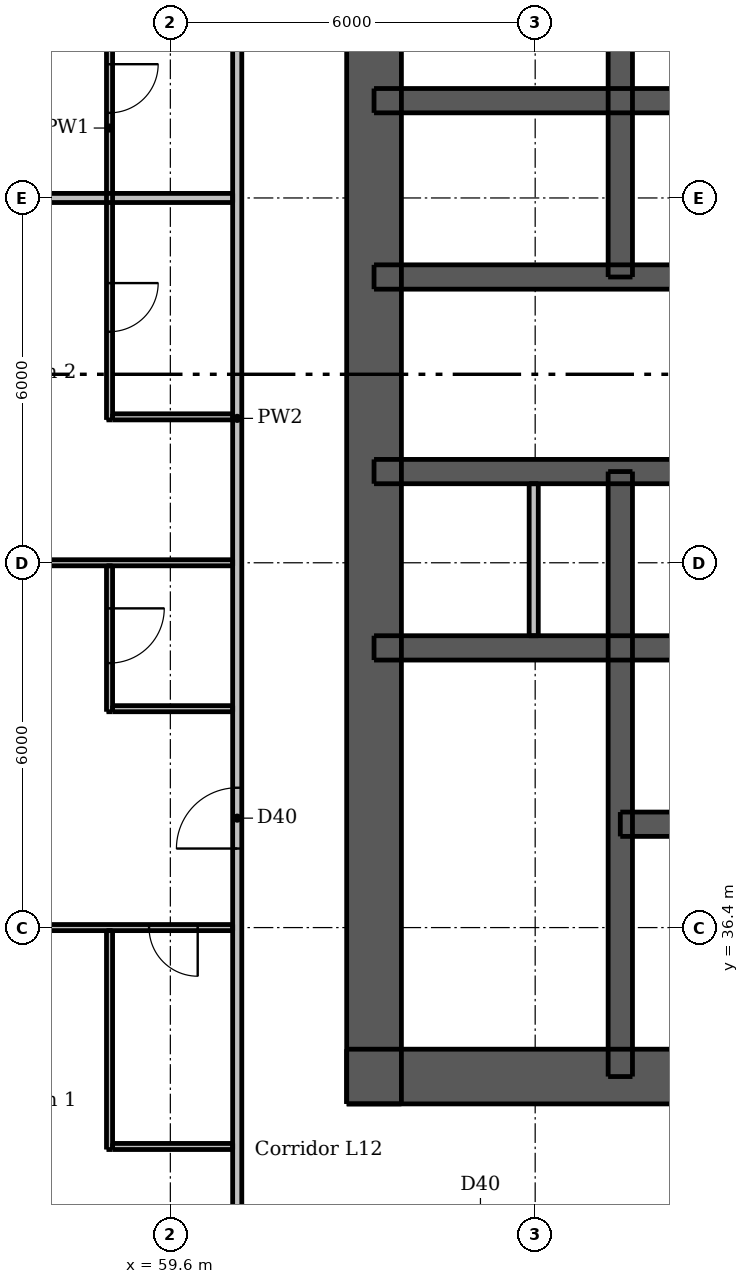
"""IFC4 building model, lengths in metres.
Left out: names, types, materials, properties, quantities, classifications, styles, units other than length and angle.
Written with IfcOpenShell. Run it as: python <this file> out.ifc"""

import sys

from ifc_helpers import new_model, si_unit, direction, frame, frame_2d, origin, place, context, subcontext, project, spatial, rectangle, extrude, element, fill, save


model = new_model("IFC4")
c1 = context("Model", 3, precision=1e-05, world=origin(), true_north=direction((0.0, 1.0)))
c2 = subcontext(c1, "Body", "Model", "MODEL_VIEW")
j1 = project(units=[si_unit("LENGTHUNIT", "METRE"), si_unit("PLANEANGLEUNIT", "RADIAN")], contexts=[c1])
p1 = place(None, origin())
s1 = spatial("IfcSite", under=j1, at=p1, CompositionType="ELEMENT")
p2 = place(p1, origin())
s2 = spatial("IfcBuilding", under=s1, at=p2, CompositionType="ELEMENT")
p3 = place(p2, frame((0.0, 0.0, 46.6)))
s3 = spatial("IfcBuildingStorey", under=s2, at=p3, CompositionType="ELEMENT", Elevation=46.6)
p4 = place(p3, frame((62.5, 33.95, 0.0), z_axis=(0.0, 0.0, 1.0), x_axis=(1.0, 0.0, 0.0)))
e1 = element("IfcWall", 1, at=p4, inside=s3, PredefinedType="SHEAR", context=c2, shape_type="SweptSolid", body=[
    extrude(rectangle(XDim=24.0, YDim=0.9, at=frame_2d((12.0, 0.0))), origin(), (0.0, 0.0, 1.0), 3.05),
])
p5 = place(p4, frame((2.05, 0.0, 0.0)))
e2 = element("IfcOpeningElement", 2, at=p5, cuts=e1, PredefinedType="OPENING", context=c2, shape_type="SweptSolid", body=[
    extrude(rectangle(XDim=1.1, YDim=2.1, at=frame_2d((0.55, 1.05))), frame((0.0, 0.46, 0.0), z_axis=(0.0, -1.0, 0.0), x_axis=(1.0, 0.0, 0.0)), (0.0, 0.0, 1.0), 0.92),
])
p6 = place(p4, frame((20.85, 0.0, 0.0)))
e3 = element("IfcOpeningElement", 3, at=p6, cuts=e1, PredefinedType="OPENING", context=c2, shape_type="SweptSolid", body=[
    extrude(rectangle(XDim=1.1, YDim=2.1, at=frame_2d((0.55, 1.05))), frame((0.0, 0.46, 0.0), z_axis=(0.0, -1.0, 0.0), x_axis=(1.0, 0.0, 0.0)), (0.0, 0.0, 1.0), 0.92),
])
p7 = place(p4, frame((8.0, 0.0, 0.0)))
e4 = element("IfcOpeningElement", 4, at=p7, cuts=e1, PredefinedType="OPENING", context=c2, shape_type="SweptSolid", body=[
    extrude(rectangle(XDim=1.1, YDim=2.1, at=frame_2d((0.55, 1.05))), frame((0.0, 0.46, 0.0), z_axis=(0.0, -1.0, 0.0), x_axis=(1.0, 0.0, 0.0)), (0.0, 0.0, 1.0), 0.92),
])
p8 = place(p4, frame((17.488, 0.0, 0.0)))
e5 = element("IfcOpeningElement", 5, at=p8, cuts=e1, PredefinedType="OPENING", context=c2, shape_type="SweptSolid", body=[
    extrude(rectangle(XDim=0.9, YDim=2.1, at=frame_2d((0.45, 1.05))), frame((0.0, 0.46, 0.0), z_axis=(0.0, -1.0, 0.0), x_axis=(1.0, 0.0, 0.0)), (0.0, 0.0, 1.0), 0.92),
])
p9 = place(p3, frame((62.95, 33.5, 0.0), z_axis=(0.0, 0.0, 1.0), x_axis=(0.0, 1.0, 0.0)))
e6 = element("IfcWall", 6, at=p9, inside=s3, PredefinedType="SHEAR", context=c2, shape_type="SweptSolid", body=[
    extrude(rectangle(XDim=24.0, YDim=0.9, at=frame_2d((12.0, 0.0))), origin(), (0.0, 0.0, 1.0), 3.05),
])
p10 = place(p9, frame((11.2, 0.0, 0.0)))
e7 = element("IfcOpeningElement", 7, at=p10, cuts=e6, PredefinedType="OPENING", context=c2, shape_type="SweptSolid", body=[
    extrude(rectangle(XDim=1.6, YDim=2.1, at=frame_2d((0.8, 1.05))), frame((0.0, 0.46, 0.0), z_axis=(0.0, -1.0, 0.0), x_axis=(1.0, 0.0, 0.0)), (0.0, 0.0, 1.0), 0.92),
])
p11 = place(p3, frame((62.95, 41.0, 0.0), z_axis=(0.0, 0.0, 1.0), x_axis=(1.0, 0.0, 0.0)))
e8 = element("IfcWall", 8, at=p11, inside=s3, PredefinedType="SHEAR", context=c2, shape_type="SweptSolid", body=[
    extrude(rectangle(XDim=23.1, YDim=0.4, at=frame_2d((11.55, 0.0))), origin(), (0.0, 0.0, 1.0), 3.05),
])
p12 = place(p3, frame((62.95, 43.9, 0.0), z_axis=(0.0, 0.0, 1.0), x_axis=(1.0, 0.0, 0.0)))
e9 = element("IfcWall", 9, at=p12, inside=s3, PredefinedType="SHEAR", context=c2, shape_type="SweptSolid", body=[
    extrude(rectangle(XDim=23.1, YDim=0.4, at=frame_2d((11.55, 0.0))), origin(), (0.0, 0.0, 1.0), 3.05),
])
p13 = place(p12, frame((1.088, 0.0, 0.0)))
e10 = element("IfcOpeningElement", 10, at=p13, cuts=e9, PredefinedType="OPENING", context=c2, shape_type="SweptSolid", body=[
    extrude(rectangle(XDim=0.9, YDim=2.1, at=frame_2d((0.45, 1.05))), frame((0.0, 0.21, 0.0), z_axis=(0.0, -1.0, 0.0), x_axis=(1.0, 0.0, 0.0)), (0.0, 0.0, 1.0), 0.42),
])
p14 = place(p12, frame((2.838, 0.0, 0.0)))
e11 = element("IfcOpeningElement", 11, at=p14, cuts=e9, PredefinedType="OPENING", context=c2, shape_type="SweptSolid", body=[
    extrude(rectangle(XDim=0.8, YDim=2.1, at=frame_2d((0.4, 1.05))), frame((0.0, 0.21, 0.0), z_axis=(0.0, -1.0, 0.0), x_axis=(1.0, 0.0, 0.0)), (0.0, 0.0, 1.0), 0.42),
])
p15 = place(p12, frame((20.5, 0.0, 0.0)))
e12 = element("IfcOpeningElement", 12, at=p15, cuts=e9, PredefinedType="OPENING", context=c2, shape_type="SweptSolid", body=[
    extrude(rectangle(XDim=0.9, YDim=2.1, at=frame_2d((0.45, 1.05))), frame((0.0, 0.21, 0.0), z_axis=(0.0, -1.0, 0.0), x_axis=(1.0, 0.0, 0.0)), (0.0, 0.0, 1.0), 0.42),
])
p16 = place(p12, frame((4.75, 0.0, 0.0)))
e13 = element("IfcOpeningElement", 13, at=p16, cuts=e9, PredefinedType="OPENING", context=c2, shape_type="SweptSolid", body=[
    extrude(rectangle(XDim=1.1, YDim=2.1, at=frame_2d((0.55, 1.05))), frame((0.0, 0.21, 0.0), z_axis=(0.0, -1.0, 0.0), x_axis=(1.0, 0.0, 0.0)), (0.0, 0.0, 1.0), 0.42),
])
p17 = place(p12, frame((7.25, 0.0, 0.0)))
e14 = element("IfcOpeningElement", 14, at=p17, cuts=e9, PredefinedType="OPENING", context=c2, shape_type="SweptSolid", body=[
    extrude(rectangle(XDim=1.1, YDim=2.1, at=frame_2d((0.55, 1.05))), frame((0.0, 0.21, 0.0), z_axis=(0.0, -1.0, 0.0), x_axis=(1.0, 0.0, 0.0)), (0.0, 0.0, 1.0), 0.42),
])
p18 = place(p12, frame((9.75, 0.0, 0.0)))
e15 = element("IfcOpeningElement", 15, at=p18, cuts=e9, PredefinedType="OPENING", context=c2, shape_type="SweptSolid", body=[
    extrude(rectangle(XDim=1.1, YDim=2.1, at=frame_2d((0.55, 1.05))), frame((0.0, 0.21, 0.0), z_axis=(0.0, -1.0, 0.0), x_axis=(1.0, 0.0, 0.0)), (0.0, 0.0, 1.0), 0.42),
])
p19 = place(p12, frame((12.25, 0.0, 0.0)))
e16 = element("IfcOpeningElement", 16, at=p19, cuts=e9, PredefinedType="OPENING", context=c2, shape_type="SweptSolid", body=[
    extrude(rectangle(XDim=1.1, YDim=2.1, at=frame_2d((0.55, 1.05))), frame((0.0, 0.21, 0.0), z_axis=(0.0, -1.0, 0.0), x_axis=(1.0, 0.0, 0.0)), (0.0, 0.0, 1.0), 0.42),
])
p20 = place(p12, frame((14.75, 0.0, 0.0)))
e17 = element("IfcOpeningElement", 17, at=p20, cuts=e9, PredefinedType="OPENING", context=c2, shape_type="SweptSolid", body=[
    extrude(rectangle(XDim=1.1, YDim=2.1, at=frame_2d((0.55, 1.05))), frame((0.0, 0.21, 0.0), z_axis=(0.0, -1.0, 0.0), x_axis=(1.0, 0.0, 0.0)), (0.0, 0.0, 1.0), 0.42),
])
p21 = place(p12, frame((17.25, 0.0, 0.0)))
e18 = element("IfcOpeningElement", 18, at=p21, cuts=e9, PredefinedType="OPENING", context=c2, shape_type="SweptSolid", body=[
    extrude(rectangle(XDim=1.1, YDim=2.1, at=frame_2d((0.55, 1.05))), frame((0.0, 0.21, 0.0), z_axis=(0.0, -1.0, 0.0), x_axis=(1.0, 0.0, 0.0)), (0.0, 0.0, 1.0), 0.42),
])
p22 = place(p3, frame((62.95, 47.1, 0.0), z_axis=(0.0, 0.0, 1.0), x_axis=(1.0, 0.0, 0.0)))
e19 = element("IfcWall", 19, at=p22, inside=s3, PredefinedType="SHEAR", context=c2, shape_type="SweptSolid", body=[
    extrude(rectangle(XDim=23.1, YDim=0.4, at=frame_2d((11.55, 0.0))), origin(), (0.0, 0.0, 1.0), 3.05),
])
p23 = place(p22, frame((1.7, 0.0, 0.0)))
e20 = element("IfcOpeningElement", 20, at=p23, cuts=e19, PredefinedType="OPENING", context=c2, shape_type="SweptSolid", body=[
    extrude(rectangle(XDim=0.9, YDim=2.1, at=frame_2d((0.45, 1.05))), frame((0.0, 0.21, 0.0), z_axis=(0.0, -1.0, 0.0), x_axis=(1.0, 0.0, 0.0)), (0.0, 0.0, 1.0), 0.42),
])
p24 = place(p22, frame((20.5, 0.0, 0.0)))
e21 = element("IfcOpeningElement", 21, at=p24, cuts=e19, PredefinedType="OPENING", context=c2, shape_type="SweptSolid", body=[
    extrude(rectangle(XDim=0.9, YDim=2.1, at=frame_2d((0.45, 1.05))), frame((0.0, 0.21, 0.0), z_axis=(0.0, -1.0, 0.0), x_axis=(1.0, 0.0, 0.0)), (0.0, 0.0, 1.0), 0.42),
])
p25 = place(p3, frame((62.95, 50.0, 0.0), z_axis=(0.0, 0.0, 1.0), x_axis=(1.0, 0.0, 0.0)))
e22 = element("IfcWall", 22, at=p25, inside=s3, PredefinedType="SHEAR", context=c2, shape_type="SweptSolid", body=[
    extrude(rectangle(XDim=23.1, YDim=0.4, at=frame_2d((11.55, 0.0))), origin(), (0.0, 0.0, 1.0), 3.05),
])
p26 = place(p3, frame((67.0, 33.95, 0.0), z_axis=(0.0, 0.0, 1.0), x_axis=(0.0, 1.0, 0.0)))
e23 = element("IfcWall", 23, at=p26, inside=s3, PredefinedType="SHEAR", context=c2, shape_type="SweptSolid", body=[
    extrude(rectangle(XDim=9.95, YDim=0.4, at=frame_2d((4.975, 0.0))), origin(), (0.0, 0.0, 1.0), 3.05),
])
p27 = place(p26, frame((0.65, 0.0, 0.0)))
e24 = element("IfcOpeningElement", 24, at=p27, cuts=e23, PredefinedType="OPENING", context=c2, shape_type="SweptSolid", body=[
    extrude(rectangle(XDim=1.1, YDim=2.1, at=frame_2d((0.55, 1.05))), frame((0.0, 0.21, 0.0), z_axis=(0.0, -1.0, 0.0), x_axis=(1.0, 0.0, 0.0)), (0.0, 0.0, 1.0), 0.42),
])
p28 = place(p3, frame((67.0, 47.1, 0.0), z_axis=(0.0, 0.0, 1.0), x_axis=(0.0, 1.0, 0.0)))
e25 = element("IfcWall", 25, at=p28, inside=s3, PredefinedType="SHEAR", context=c2, shape_type="SweptSolid", body=[
    extrude(rectangle(XDim=9.95, YDim=0.4, at=frame_2d((4.975, 0.0))), origin(), (0.0, 0.0, 1.0), 3.05),
])
p29 = place(p3, frame((67.0, 38.1, 0.0), z_axis=(0.0, 0.0, 1.0), x_axis=(1.0, 0.0, 0.0)))
e26 = element("IfcWall", 26, at=p29, inside=s3, PredefinedType="SHEAR", context=c2, shape_type="SweptSolid", body=[
    extrude(rectangle(XDim=7.5, YDim=0.4, at=frame_2d((3.75, 0.0))), origin(), (0.0, 0.0, 1.0), 3.05),
])
p30 = place(p29, frame((0.7, 0.0, 0.0)))
e27 = element("IfcOpeningElement", 27, at=p30, cuts=e26, PredefinedType="OPENING", context=c2, shape_type="SweptSolid", body=[
    extrude(rectangle(XDim=1.1, YDim=2.1, at=frame_2d((0.55, 1.05))), frame((0.0, 0.21, 0.0), z_axis=(0.0, -1.0, 0.0), x_axis=(1.0, 0.0, 0.0)), (0.0, 0.0, 1.0), 0.42),
])
p31 = place(p29, frame((3.2, 0.0, 0.0)))
e28 = element("IfcOpeningElement", 28, at=p31, cuts=e26, PredefinedType="OPENING", context=c2, shape_type="SweptSolid", body=[
    extrude(rectangle(XDim=1.1, YDim=2.1, at=frame_2d((0.55, 1.05))), frame((0.0, 0.21, 0.0), z_axis=(0.0, -1.0, 0.0), x_axis=(1.0, 0.0, 0.0)), (0.0, 0.0, 1.0), 0.42),
])
p32 = place(p29, frame((5.65, 0.0, 0.0)))
e29 = element("IfcOpeningElement", 29, at=p32, cuts=e26, PredefinedType="OPENING", context=c2, shape_type="SweptSolid", body=[
    extrude(rectangle(XDim=1.2, YDim=2.1, at=frame_2d((0.6, 1.05))), frame((0.0, 0.21, 0.0), z_axis=(0.0, -1.0, 0.0), x_axis=(1.0, 0.0, 0.0)), (0.0, 0.0, 1.0), 0.42),
])
p33 = place(p3, frame((65.576, 41.2, 0.0), z_axis=(0.0, 0.0, 1.0), x_axis=(0.0, 1.0, 0.0)))
e30 = element("IfcWall", 30, at=p33, inside=s3, PredefinedType="PLUMBINGWALL", context=c2, shape_type="SweptSolid", body=[
    extrude(rectangle(XDim=2.5, YDim=0.15, at=frame_2d((1.25, 0.0))), origin(), (0.0, 0.0, 1.0), 3.05),
])
p34 = place(p3, frame((58.6, 32.75, 0.0), z_axis=(0.0, 0.0, 1.0), x_axis=(0.0, 1.0, 0.0)))
e31 = element("IfcWall", 31, at=p34, inside=s3, PredefinedType="PARTITIONING", context=c2, shape_type="SweptSolid", body=[
    extrude(rectangle(XDim=3.6, YDim=0.1, at=frame_2d((1.8, 0.0))), origin(), (0.0, 0.0, 1.0), 3.05),
])
p35 = place(p3, frame((58.6, 42.35, 0.0), z_axis=(0.0, 0.0, 1.0), x_axis=(0.0, -1.0, 0.0)))
e32 = element("IfcWall", 32, at=p35, inside=s3, PredefinedType="PARTITIONING", context=c2, shape_type="SweptSolid", body=[
    extrude(rectangle(XDim=2.4, YDim=0.1, at=frame_2d((1.2, 0.0))), origin(), (0.0, 0.0, 1.0), 3.05),
])
p36 = place(p35, frame((0.7, 0.0, 0.0)))
e33 = element("IfcOpeningElement", 33, at=p36, cuts=e32, PredefinedType="OPENING", context=c2, shape_type="SweptSolid", body=[
    extrude(rectangle(XDim=0.9, YDim=2.1, at=frame_2d((0.45, 1.05))), frame((0.0, 0.06, 0.0), z_axis=(0.0, -1.0, 0.0), x_axis=(1.0, 0.0, 0.0)), (0.0, 0.0, 1.0), 0.12),
])
p37 = place(p3, frame((58.6, 54.35, 0.0), z_axis=(0.0, 0.0, 1.0), x_axis=(0.0, -1.0, 0.0)))
e34 = element("IfcWall", 34, at=p37, inside=s3, PredefinedType="PARTITIONING", context=c2, shape_type="SweptSolid", body=[
    extrude(rectangle(XDim=9.6, YDim=0.1, at=frame_2d((4.8, 0.0))), origin(), (0.0, 0.0, 1.0), 3.05),
])
p38 = place(p37, frame((7.35, 0.0, 0.0)))
e35 = element("IfcOpeningElement", 35, at=p38, cuts=e34, PredefinedType="OPENING", context=c2, shape_type="SweptSolid", body=[
    extrude(rectangle(XDim=0.8, YDim=2.1, at=frame_2d((0.4, 1.05))), frame((0.0, 0.06, 0.0), z_axis=(0.0, -1.0, 0.0), x_axis=(1.0, 0.0, 0.0)), (0.0, 0.0, 1.0), 0.12),
])
p39 = place(p37, frame((3.75, 0.0, 0.0)))
e36 = element("IfcOpeningElement", 36, at=p39, cuts=e34, PredefinedType="OPENING", context=c2, shape_type="SweptSolid", body=[
    extrude(rectangle(XDim=0.8, YDim=2.1, at=frame_2d((0.4, 1.05))), frame((0.0, 0.06, 0.0), z_axis=(0.0, -1.0, 0.0), x_axis=(1.0, 0.0, 0.0)), (0.0, 0.0, 1.0), 0.12),
])
p40 = place(p3, frame((58.65, 44.8, 0.0), z_axis=(0.0, 0.0, 1.0), x_axis=(1.0, 0.0, 0.0)))
e37 = element("IfcWall", 37, at=p40, inside=s3, PredefinedType="PARTITIONING", context=c2, shape_type="SweptSolid", body=[
    extrude(rectangle(XDim=1.975, YDim=0.1, at=frame_2d((0.988, 0.0))), origin(), (0.0, 0.0, 1.0), 3.05),
])
p41 = place(p3, frame((52.0, 42.4, 0.0), z_axis=(0.0, 0.0, 1.0), x_axis=(1.0, 0.0, 0.0)))
e38 = element("IfcWall", 38, at=p41, inside=s3, PredefinedType="PARTITIONING", context=c2, shape_type="SweptSolid", body=[
    extrude(rectangle(XDim=8.625, YDim=0.1, at=frame_2d((4.312, 0.0))), origin(), (0.0, 0.0, 1.0), 2.516),
])
p42 = place(p41, frame((2.85, 0.0, 0.0)))
e39 = element("IfcOpeningElement", 39, at=p42, cuts=e38, PredefinedType="OPENING", context=c2, shape_type="SweptSolid", body=[
    extrude(rectangle(XDim=0.9, YDim=2.1, at=frame_2d((0.45, 1.05))), frame((0.0, 0.06, 0.0), z_axis=(0.0, -1.0, 0.0), x_axis=(1.0, 0.0, 0.0)), (0.0, 0.0, 1.0), 0.12),
])
p43 = place(p3, frame((58.65, 40.0, 0.0), z_axis=(0.0, 0.0, 1.0), x_axis=(1.0, 0.0, 0.0)))
e40 = element("IfcWall", 40, at=p43, inside=s3, PredefinedType="PARTITIONING", context=c2, shape_type="SweptSolid", body=[
    extrude(rectangle(XDim=1.975, YDim=0.1, at=frame_2d((0.988, 0.0))), origin(), (0.0, 0.0, 1.0), 3.05),
])
p44 = place(p3, frame((60.625, 36.4, 0.0), z_axis=(0.0, 0.0, 1.0), x_axis=(-1.0, 0.0, 0.0)))
e41 = element("IfcWall", 41, at=p44, inside=s3, PredefinedType="PARTITIONING", context=c2, shape_type="SweptSolid", body=[
    extrude(rectangle(XDim=8.625, YDim=0.1, at=frame_2d((4.312, 0.0))), origin(), (0.0, 0.0, 1.0), 2.516),
])
p45 = place(p44, frame((4.875, 0.0, 0.0)))
e42 = element("IfcOpeningElement", 42, at=p45, cuts=e41, PredefinedType="OPENING", context=c2, shape_type="SweptSolid", body=[
    extrude(rectangle(XDim=0.9, YDim=2.1, at=frame_2d((0.45, 1.05))), frame((0.0, 0.06, 0.0), z_axis=(0.0, -1.0, 0.0), x_axis=(1.0, 0.0, 0.0)), (0.0, 0.0, 1.0), 0.12),
])
p46 = place(p44, frame((0.575, 0.0, 0.0)))
e43 = element("IfcOpeningElement", 43, at=p46, cuts=e41, PredefinedType="OPENING", context=c2, shape_type="SweptSolid", body=[
    extrude(rectangle(XDim=0.8, YDim=2.1, at=frame_2d((0.4, 1.05))), frame((0.0, 0.06, 0.0), z_axis=(0.0, -1.0, 0.0), x_axis=(1.0, 0.0, 0.0)), (0.0, 0.0, 1.0), 0.12),
])
p47 = place(p3, frame((58.65, 32.8, 0.0), z_axis=(0.0, 0.0, 1.0), x_axis=(1.0, 0.0, 0.0)))
e44 = element("IfcWall", 44, at=p47, inside=s3, PredefinedType="PARTITIONING", context=c2, shape_type="SweptSolid", body=[
    extrude(rectangle(XDim=1.975, YDim=0.1, at=frame_2d((0.988, 0.0))), origin(), (0.0, 0.0, 1.0), 3.05),
])
p48 = place(p3, frame((60.7, 30.325, 0.0), z_axis=(0.0, 0.0, 1.0), x_axis=(0.0, 1.0, 0.0)))
e45 = element("IfcWall", 45, at=p48, inside=s3, PredefinedType="PARTITIONING", context=c2, shape_type="SweptSolid", body=[
    extrude(rectangle(XDim=28.9, YDim=0.15, at=frame_2d((14.45, 0.0))), origin(), (0.0, 0.0, 1.0), 3.05),
])
p49 = place(p48, frame((7.375, 0.0, 0.0)))
e46 = element("IfcOpeningElement", 46, at=p49, cuts=e45, PredefinedType="OPENING", context=c2, shape_type="SweptSolid", body=[
    extrude(rectangle(XDim=1.0, YDim=2.1, at=frame_2d((0.5, 1.05))), frame((0.0, 0.085, 0.0), z_axis=(0.0, -1.0, 0.0), x_axis=(1.0, 0.0, 0.0)), (0.0, 0.0, 1.0), 0.17),
])
p50 = place(p48, frame((26.025, 0.0, 0.0)))
e47 = element("IfcOpeningElement", 47, at=p50, cuts=e45, PredefinedType="OPENING", context=c2, shape_type="SweptSolid", body=[
    extrude(rectangle(XDim=1.0, YDim=2.1, at=frame_2d((0.5, 1.05))), frame((0.0, 0.085, 0.0), z_axis=(0.0, -1.0, 0.0), x_axis=(1.0, 0.0, 0.0)), (0.0, 0.0, 1.0), 0.17),
])
p51 = place(p3, frame((52.0, 48.4, 0.0), z_axis=(0.0, 0.0, 1.0), x_axis=(1.0, 0.0, 0.0)))
e48 = element("IfcWall", 48, at=p51, inside=s3, PredefinedType="PARTITIONING", context=c2, shape_type="SweptSolid", body=[
    extrude(rectangle(XDim=8.625, YDim=0.15, at=frame_2d((4.312, 0.0))), origin(), (0.0, 0.0, 1.0), 2.516),
])
p52 = place(p5, origin())
e49 = element("IfcDoor", 49, at=p52, inside=s3, OperationType="SINGLE_SWING_LEFT", PredefinedType="DOOR", context=c2, shape_type="SweptSolid", body=[
    extrude(rectangle(XDim=1.1, YDim=2.1, at=frame_2d((0.55, 1.05))), frame((0.0, 0.438, 0.0), z_axis=(0.0, -1.0, 0.0), x_axis=(1.0, 0.0, 0.0)), (0.0, 0.0, 1.0), 0.05),
])
fill(e2, e49)
p53 = place(p10, origin())
e50 = element("IfcDoor", 50, at=p53, inside=s3, OperationType="DOUBLE_DOOR_SINGLE_SWING", PredefinedType="DOOR", context=c2, shape_type="SweptSolid", body=[
    extrude(rectangle(XDim=1.6, YDim=2.1, at=frame_2d((0.8, 1.05))), frame((0.0, -0.388, 0.0), z_axis=(0.0, -1.0, 0.0), x_axis=(1.0, 0.0, 0.0)), (0.0, 0.0, 1.0), 0.05),
])
fill(e7, e50)
p54 = place(p27, origin())
e51 = element("IfcDoor", 51, at=p54, inside=s3, OperationType="SINGLE_SWING_RIGHT", PredefinedType="DOOR", context=c2, shape_type="SweptSolid", body=[
    extrude(rectangle(XDim=1.1, YDim=2.1, at=frame_2d((0.55, 1.05))), frame((0.0, -0.138, 0.0), z_axis=(0.0, -1.0, 0.0), x_axis=(1.0, 0.0, 0.0)), (0.0, 0.0, 1.0), 0.05),
])
fill(e24, e51)
p55 = place(p13, origin())
e52 = element("IfcDoor", 52, at=p55, inside=s3, OperationType="SINGLE_SWING_LEFT", PredefinedType="DOOR", context=c2, shape_type="SweptSolid", body=[
    extrude(rectangle(XDim=0.9, YDim=2.1, at=frame_2d((0.45, 1.05))), frame((0.0, -0.138, 0.0), z_axis=(0.0, -1.0, 0.0), x_axis=(1.0, 0.0, 0.0)), (0.0, 0.0, 1.0), 0.05),
])
fill(e10, e52)
p56 = place(p14, origin())
e53 = element("IfcDoor", 53, at=p56, inside=s3, OperationType="SINGLE_SWING_RIGHT", PredefinedType="DOOR", context=c2, shape_type="SweptSolid", body=[
    extrude(rectangle(XDim=0.8, YDim=2.1, at=frame_2d((0.4, 1.05))), frame((0.0, -0.138, 0.0), z_axis=(0.0, -1.0, 0.0), x_axis=(1.0, 0.0, 0.0)), (0.0, 0.0, 1.0), 0.05),
])
fill(e11, e53)
p57 = place(p23, origin())
e54 = element("IfcDoor", 54, at=p57, inside=s3, OperationType="SINGLE_SWING_LEFT", PredefinedType="DOOR", context=c2, shape_type="SweptSolid", body=[
    extrude(rectangle(XDim=0.9, YDim=2.1, at=frame_2d((0.45, 1.05))), frame((0.0, 0.188, 0.0), z_axis=(0.0, -1.0, 0.0), x_axis=(1.0, 0.0, 0.0)), (0.0, 0.0, 1.0), 0.05),
])
fill(e20, e54)
p58 = place(p16, origin())
e55 = element("IfcDoor", 55, at=p58, inside=s3, OperationType="DOUBLE_DOOR_SLIDING", PredefinedType="DOOR", context=c2, shape_type="SweptSolid", body=[
    extrude(rectangle(XDim=1.1, YDim=2.1, at=frame_2d((0.55, 1.05))), frame((0.0, 0.025, 0.0), z_axis=(0.0, -1.0, 0.0), x_axis=(1.0, 0.0, 0.0)), (0.0, 0.0, 1.0), 0.05),
])
fill(e13, e55)
p59 = place(p30, origin())
e56 = element("IfcDoor", 56, at=p59, inside=s3, OperationType="DOUBLE_DOOR_SLIDING", PredefinedType="DOOR", context=c2, shape_type="SweptSolid", body=[
    extrude(rectangle(XDim=1.1, YDim=2.1, at=frame_2d((0.55, 1.05))), frame((0.0, 0.025, 0.0), z_axis=(0.0, -1.0, 0.0), x_axis=(1.0, 0.0, 0.0)), (0.0, 0.0, 1.0), 0.05),
])
fill(e27, e56)
p60 = place(p49, origin())
e57 = element("IfcDoor", 57, at=p60, inside=s3, OperationType="SINGLE_SWING_LEFT", PredefinedType="DOOR", context=c2, shape_type="SweptSolid", body=[
    extrude(rectangle(XDim=1.0, YDim=2.1, at=frame_2d((0.5, 1.05))), frame((0.0, 0.025, 0.0), z_axis=(0.0, -1.0, 0.0), x_axis=(1.0, 0.0, 0.0)), (0.0, 0.0, 1.0), 0.05),
])
fill(e46, e57)
p61 = place(p36, origin())
e58 = element("IfcDoor", 58, at=p61, inside=s3, OperationType="SINGLE_SWING_LEFT", PredefinedType="DOOR", context=c2, shape_type="SweptSolid", body=[
    extrude(rectangle(XDim=0.9, YDim=2.1, at=frame_2d((0.45, 1.05))), frame((0.0, 0.025, 0.0), z_axis=(0.0, -1.0, 0.0), x_axis=(1.0, 0.0, 0.0)), (0.0, 0.0, 1.0), 0.05),
])
fill(e33, e58)
p62 = place(p46, origin())
e59 = element("IfcDoor", 59, at=p62, inside=s3, OperationType="SINGLE_SWING_LEFT", PredefinedType="DOOR", context=c2, shape_type="SweptSolid", body=[
    extrude(rectangle(XDim=0.8, YDim=2.1, at=frame_2d((0.4, 1.05))), frame((0.0, 0.025, 0.0), z_axis=(0.0, -1.0, 0.0), x_axis=(1.0, 0.0, 0.0)), (0.0, 0.0, 1.0), 0.05),
])
fill(e43, e59)
p63 = place(p38, origin())
e60 = element("IfcDoor", 60, at=p63, inside=s3, OperationType="SINGLE_SWING_LEFT", PredefinedType="DOOR", context=c2, shape_type="SweptSolid", body=[
    extrude(rectangle(XDim=0.8, YDim=2.1, at=frame_2d((0.4, 1.05))), frame((0.0, 0.025, 0.0), z_axis=(0.0, -1.0, 0.0), x_axis=(1.0, 0.0, 0.0)), (0.0, 0.0, 1.0), 0.05),
])
fill(e35, e60)
p64 = place(p39, origin())
e61 = element("IfcDoor", 61, at=p64, inside=s3, OperationType="SINGLE_SWING_LEFT", PredefinedType="DOOR", context=c2, shape_type="SweptSolid", body=[
    extrude(rectangle(XDim=0.8, YDim=2.1, at=frame_2d((0.4, 1.05))), frame((0.0, 0.025, 0.0), z_axis=(0.0, -1.0, 0.0), x_axis=(1.0, 0.0, 0.0)), (0.0, 0.0, 1.0), 0.05),
])
fill(e36, e61)
save(model, sys.argv[1])
